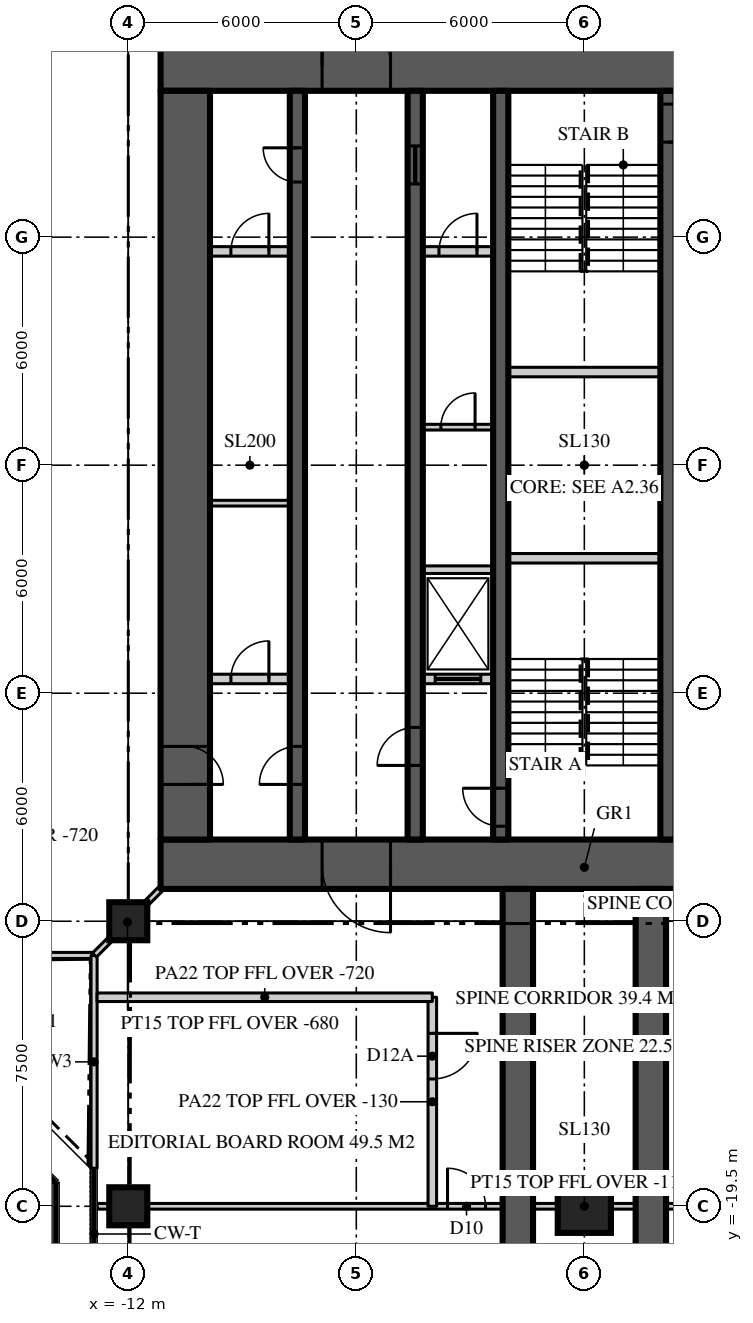
"""IFC4 building model, lengths in metres.
Left out: names, types, materials, properties, quantities, classifications, styles, units other than length and angle.
Written with IfcOpenShell. Run it as: python <this file> out.ifc"""

import sys

from ifc_helpers import new_model, si_unit, direction, frame, frame_2d, origin, origin_2d, place, context, subcontext, project, spatial, rectangle, extrude, element, fill, save


model = new_model("IFC4")
c1 = context("Model", 3, precision=1e-05, world=origin(), true_north=direction((0.0, 1.0)))
c2 = subcontext(c1, "Body", "Model", "MODEL_VIEW")
j1 = project(units=[si_unit("LENGTHUNIT", "METRE"), si_unit("PLANEANGLEUNIT", "RADIAN")], contexts=[c1])
p1 = place(None, origin())
s1 = spatial("IfcSite", under=j1, at=p1, CompositionType="ELEMENT")
p2 = place(p1, origin())
s2 = spatial("IfcBuilding", under=s1, at=p2, CompositionType="ELEMENT")
p3 = place(p2, frame((0.0, 0.0, 282.9)))
s3 = spatial("IfcBuildingStorey", under=s2, at=p3, CompositionType="ELEMENT", Elevation=282.9)
p4 = place(p3, frame((-11.15, 10.5, 0.0), z_axis=(0.0, 0.0, 1.0), x_axis=(1.0, 0.0, 0.0)))
e1 = element("IfcWall", 1, at=p4, inside=s3, PredefinedType="SHEAR", context=c2, shape_type="SweptSolid", body=[
    extrude(rectangle(XDim=22.3, YDim=1.3, at=frame_2d((11.15, 0.0))), origin(), (0.0, 0.0, 1.0), 3.9),
])
p5 = place(p4, frame((4.25, 0.0, 0.0)))
e2 = element("IfcOpeningElement", 2, at=p5, cuts=e1, PredefinedType="OPENING", context=c2, shape_type="SweptSolid", body=[
    extrude(rectangle(XDim=1.8, YDim=2.2, at=frame_2d((0.9, 1.1))), frame((0.0, 0.66, 0.0), z_axis=(0.0, -1.0, 0.0), x_axis=(1.0, 0.0, 0.0)), (0.0, 0.0, 1.0), 1.32),
])
p6 = place(p4, frame((16.25, 0.0, 0.0)))
e3 = element("IfcOpeningElement", 3, at=p6, cuts=e1, PredefinedType="OPENING", context=c2, shape_type="SweptSolid", body=[
    extrude(rectangle(XDim=1.8, YDim=2.2, at=frame_2d((0.9, 1.1))), frame((0.0, 0.66, 0.0), z_axis=(0.0, -1.0, 0.0), x_axis=(1.0, 0.0, 0.0)), (0.0, 0.0, 1.0), 1.32),
])
p7 = place(p3, frame((11.15, -10.5, 0.0), z_axis=(0.0, 0.0, 1.0), x_axis=(-1.0, 0.0, 0.0)))
e4 = element("IfcWall", 4, at=p7, inside=s3, PredefinedType="SHEAR", context=c2, shape_type="SweptSolid", body=[
    extrude(rectangle(XDim=22.3, YDim=1.3, at=frame_2d((11.15, 0.0))), origin(), (0.0, 0.0, 1.0), 3.9),
])
p8 = place(p7, frame((16.25, 0.0, 0.0)))
e5 = element("IfcOpeningElement", 5, at=p8, cuts=e4, PredefinedType="OPENING", context=c2, shape_type="SweptSolid", body=[
    extrude(rectangle(XDim=1.8, YDim=2.2, at=frame_2d((0.9, 1.1))), frame((0.0, 0.66, 0.0), z_axis=(0.0, -1.0, 0.0), x_axis=(1.0, 0.0, 0.0)), (0.0, 0.0, 1.0), 1.32),
])
p9 = place(p7, frame((4.25, 0.0, 0.0)))
e6 = element("IfcOpeningElement", 6, at=p9, cuts=e4, PredefinedType="OPENING", context=c2, shape_type="SweptSolid", body=[
    extrude(rectangle(XDim=1.8, YDim=2.2, at=frame_2d((0.9, 1.1))), frame((0.0, 0.66, 0.0), z_axis=(0.0, -1.0, 0.0), x_axis=(1.0, 0.0, 0.0)), (0.0, 0.0, 1.0), 1.32),
])
p10 = place(p3, frame((-10.5, 9.85, 0.0), z_axis=(0.0, 0.0, 1.0), x_axis=(0.0, -1.0, 0.0)))
e7 = element("IfcWall", 7, at=p10, inside=s3, PredefinedType="SHEAR", context=c2, shape_type="SweptSolid", body=[
    extrude(rectangle(XDim=19.7, YDim=1.3, at=frame_2d((9.85, 0.0))), origin(), (0.0, 0.0, 1.0), 3.9),
])
p11 = place(p10, frame((17.25, 0.0, 0.0)))
e8 = element("IfcOpeningElement", 8, at=p11, cuts=e7, PredefinedType="OPENING", context=c2, shape_type="SweptSolid", body=[
    extrude(rectangle(XDim=1.0, YDim=2.2, at=frame_2d((0.5, 1.1))), frame((0.0, 0.66, 0.0), z_axis=(0.0, -1.0, 0.0), x_axis=(1.0, 0.0, 0.0)), (0.0, 0.0, 1.0), 1.32),
])
for number, where, z_axis, x_axis in (
    (9, (-1.75, -11.15, 0.0), (0.0, 0.0, 1.0), (0.0, -1.0, 0.0)),
    (10, (1.75, -11.15, 0.0), (0.0, 0.0, 1.0), (0.0, -1.0, 0.0)),
):
    element("IfcWall", number, at=place(p3, frame(where, z_axis=z_axis, x_axis=x_axis)), inside=s3, PredefinedType="SHEAR", context=c2, shape_type="SweptSolid", body=[
        extrude(rectangle(XDim=15.25, YDim=0.8, at=frame_2d((7.625, 0.0))), origin(), (0.0, 0.0, 1.0), 3.9),
    ])
p12 = place(p3, frame((-12.0, -19.5, 0.0), z_axis=(0.0, 0.0, 1.0), x_axis=(1.0, 0.0, 0.0)))
e11 = element("IfcColumn", 11, at=p12, inside=s3, PredefinedType="COLUMN", context=c2, shape_type="SweptSolid", body=[
    extrude(rectangle(XDim=1.0, YDim=1.0, at=origin_2d()), origin(), (0.0, 0.0, 1.0), 3.9),
])
p13 = place(p3, frame((0.0, -19.5, 0.0), z_axis=(0.0, 0.0, 1.0), x_axis=(1.0, 0.0, 0.0)))
e12 = element("IfcColumn", 12, at=p13, inside=s3, PredefinedType="COLUMN", context=c2, shape_type="SweptSolid", body=[
    extrude(rectangle(XDim=1.4, YDim=1.4, at=origin_2d()), origin(), (0.0, 0.0, 1.0), 3.9),
])
p14 = place(p3, frame((-12.0, -12.0, 0.0), z_axis=(0.0, 0.0, 1.0), x_axis=(1.0, 0.0, 0.0)))
e13 = element("IfcColumn", 13, at=p14, inside=s3, PredefinedType="COLUMN", context=c2, shape_type="SweptSolid", body=[
    extrude(rectangle(XDim=1.0, YDim=1.0, at=origin_2d()), origin(), (0.0, 0.0, 1.0), 3.9),
])
p15 = place(p3, frame((-18.5, -12.9, 0.0), z_axis=(0.0, 0.0, 1.0), x_axis=(1.0, 0.0, 0.0)))
e14 = element("IfcWall", 14, at=p15, inside=s3, PredefinedType="SOLIDWALL", context=c2, shape_type="SweptSolid", body=[
    extrude(rectangle(XDim=5.6, YDim=0.16, at=frame_2d((2.8, 0.0))), origin(), (0.0, 0.0, 1.0), 3.77),
])
p16 = place(p15, frame((2.3, 0.0, 0.0)))
e15 = element("IfcOpeningElement", 15, at=p16, cuts=e14, PredefinedType="OPENING", context=c2, shape_type="SweptSolid", body=[
    extrude(rectangle(XDim=1.0, YDim=2.2, at=frame_2d((0.5, 1.1))), frame((0.0, 0.09, 0.0), z_axis=(0.0, -1.0, 0.0), x_axis=(1.0, 0.0, 0.0)), (0.0, 0.0, 1.0), 0.18),
])
p17 = place(p3, frame((-12.9, -12.9, 0.0), z_axis=(0.0, 0.0, 1.0), x_axis=(0.0, -1.0, 0.0)))
e16 = element("IfcWall", 16, at=p17, inside=s3, PredefinedType="SOLIDWALL", context=c2, shape_type="SweptSolid", body=[
    extrude(rectangle(XDim=5.6, YDim=0.16, at=frame_2d((2.8, 0.0))), origin(), (0.0, 0.0, 1.0), 3.77),
])
p18 = place(p3, frame((-7.55, -9.85, 0.0), z_axis=(0.0, 0.0, 1.0), x_axis=(0.0, 1.0, 0.0)))
e17 = element("IfcWall", 17, at=p18, inside=s3, PredefinedType="SHEAR", context=c2, shape_type="SweptSolid", body=[
    extrude(rectangle(XDim=19.7, YDim=0.4, at=frame_2d((9.85, 0.0))), origin(), (0.0, 0.0, 1.0), 3.9),
])
p19 = place(p18, frame((1.45, 0.0, 0.0)))
e18 = element("IfcOpeningElement", 18, at=p19, cuts=e17, PredefinedType="OPENING", context=c2, shape_type="SweptSolid", body=[
    extrude(rectangle(XDim=1.0, YDim=2.2, at=frame_2d((0.5, 1.1))), frame((0.0, 0.21, 0.0), z_axis=(0.0, -1.0, 0.0), x_axis=(1.0, 0.0, 0.0)), (0.0, 0.0, 1.0), 0.42),
])
p20 = place(p18, frame((17.3, 0.0, 0.0)))
e19 = element("IfcOpeningElement", 19, at=p20, cuts=e17, PredefinedType="OPENING", context=c2, shape_type="SweptSolid", body=[
    extrude(rectangle(XDim=0.9, YDim=2.1, at=frame_2d((0.45, 1.05))), frame((0.0, 0.21, 0.0), z_axis=(0.0, -1.0, 0.0), x_axis=(1.0, 0.0, 0.0)), (0.0, 0.0, 1.0), 0.42),
])
p21 = place(p3, frame((-4.45, -9.85, 0.0), z_axis=(0.0, 0.0, 1.0), x_axis=(0.0, 1.0, 0.0)))
e20 = element("IfcWall", 20, at=p21, inside=s3, PredefinedType="SHEAR", context=c2, shape_type="SweptSolid", body=[
    extrude(rectangle(XDim=19.7, YDim=0.4, at=frame_2d((9.85, 0.0))), origin(), (0.0, 0.0, 1.0), 3.9),
])
p22 = place(p21, frame((1.95, 0.0, 0.0)))
e21 = element("IfcOpeningElement", 21, at=p22, cuts=e20, PredefinedType="OPENING", context=c2, shape_type="SweptSolid", body=[
    extrude(rectangle(XDim=1.0, YDim=2.2, at=frame_2d((0.5, 1.1))), frame((0.0, 0.21, 0.0), z_axis=(0.0, -1.0, 0.0), x_axis=(1.0, 0.0, 0.0)), (0.0, 0.0, 1.0), 0.42),
])
p23 = place(p21, frame((17.25, 0.0, 0.0)))
e22 = element("IfcOpeningElement", 22, at=p23, cuts=e20, PredefinedType="OPENING", context=c2, shape_type="SweptSolid", body=[
    extrude(rectangle(XDim=1.0, YDim=2.1, at=frame_2d((0.5, 1.05))), frame((0.0, 0.21, 0.0), z_axis=(0.0, -1.0, 0.0), x_axis=(1.0, 0.0, 0.0)), (0.0, 0.0, 1.0), 0.42),
])
p24 = place(p3, frame((-2.2, -9.85, 0.0), z_axis=(0.0, 0.0, 1.0), x_axis=(0.0, 1.0, 0.0)))
e23 = element("IfcWall", 23, at=p24, inside=s3, PredefinedType="SHEAR", context=c2, shape_type="SweptSolid", body=[
    extrude(rectangle(XDim=19.7, YDim=0.4, at=frame_2d((9.85, 0.0))), origin(), (0.0, 0.0, 1.0), 3.9),
])
p25 = place(p24, frame((0.35, 0.0, 0.0)))
e24 = element("IfcOpeningElement", 24, at=p25, cuts=e23, PredefinedType="OPENING", context=c2, shape_type="SweptSolid", body=[
    extrude(rectangle(XDim=1.0, YDim=2.2, at=frame_2d((0.5, 1.1))), frame((0.0, 0.21, 0.0), z_axis=(0.0, -1.0, 0.0), x_axis=(1.0, 0.0, 0.0)), (0.0, 0.0, 1.0), 0.42),
])
p26 = place(p3, frame((2.2, 9.85, 0.0), z_axis=(0.0, 0.0, 1.0), x_axis=(0.0, -1.0, 0.0)))
e25 = element("IfcWall", 25, at=p26, inside=s3, PredefinedType="SHEAR", context=c2, shape_type="SweptSolid", body=[
    extrude(rectangle(XDim=19.7, YDim=0.4, at=frame_2d((9.85, 0.0))), origin(), (0.0, 0.0, 1.0), 3.9),
])
p27 = place(p26, frame((0.35, 0.0, 0.0)))
e26 = element("IfcOpeningElement", 26, at=p27, cuts=e25, PredefinedType="OPENING", context=c2, shape_type="SweptSolid", body=[
    extrude(rectangle(XDim=1.0, YDim=2.2, at=frame_2d((0.5, 1.1))), frame((0.0, 0.21, 0.0), z_axis=(0.0, -1.0, 0.0), x_axis=(1.0, 0.0, 0.0)), (0.0, 0.0, 1.0), 0.42),
])
p28 = place(p3, frame((-9.85, 5.625, 0.0), z_axis=(0.0, 0.0, 1.0), x_axis=(1.0, 0.0, 0.0)))
e27 = element("IfcWall", 27, at=p28, inside=s3, PredefinedType="SOLIDWALL", context=c2, shape_type="SweptSolid", body=[
    extrude(rectangle(XDim=2.1, YDim=0.25, at=frame_2d((1.05, 0.0))), origin(), (0.0, 0.0, 1.0), 3.7),
])
p29 = place(p28, frame((0.55, 0.0, 0.0)))
e28 = element("IfcOpeningElement", 28, at=p29, cuts=e27, PredefinedType="OPENING", context=c2, shape_type="SweptSolid", body=[
    extrude(rectangle(XDim=1.0, YDim=2.2, at=frame_2d((0.5, 1.1))), frame((0.0, 0.135, 0.0), z_axis=(0.0, -1.0, 0.0), x_axis=(1.0, 0.0, 0.0)), (0.0, 0.0, 1.0), 0.27),
])
p30 = place(p3, frame((-4.25, 5.625, 0.0), z_axis=(0.0, 0.0, 1.0), x_axis=(1.0, 0.0, 0.0)))
e29 = element("IfcWall", 29, at=p30, inside=s3, PredefinedType="SOLIDWALL", context=c2, shape_type="SweptSolid", body=[
    extrude(rectangle(XDim=1.85, YDim=0.25, at=frame_2d((0.925, 0.0))), origin(), (0.0, 0.0, 1.0), 3.7),
])
p31 = place(p30, frame((0.425, 0.0, 0.0)))
e30 = element("IfcOpeningElement", 30, at=p31, cuts=e29, PredefinedType="OPENING", context=c2, shape_type="SweptSolid", body=[
    extrude(rectangle(XDim=1.0, YDim=2.2, at=frame_2d((0.5, 1.1))), frame((0.0, 0.135, 0.0), z_axis=(0.0, -1.0, 0.0), x_axis=(1.0, 0.0, 0.0)), (0.0, 0.0, 1.0), 0.27),
])
p32 = place(p3, frame((-9.85, -5.625, 0.0), z_axis=(0.0, 0.0, 1.0), x_axis=(1.0, 0.0, 0.0)))
e31 = element("IfcWall", 31, at=p32, inside=s3, PredefinedType="SOLIDWALL", context=c2, shape_type="SweptSolid", body=[
    extrude(rectangle(XDim=2.1, YDim=0.25, at=frame_2d((1.05, 0.0))), origin(), (0.0, 0.0, 1.0), 3.7),
])
p33 = place(p32, frame((0.55, 0.0, 0.0)))
e32 = element("IfcOpeningElement", 32, at=p33, cuts=e31, PredefinedType="OPENING", context=c2, shape_type="SweptSolid", body=[
    extrude(rectangle(XDim=1.0, YDim=2.2, at=frame_2d((0.5, 1.1))), frame((0.0, 0.135, 0.0), z_axis=(0.0, -1.0, 0.0), x_axis=(1.0, 0.0, 0.0)), (0.0, 0.0, 1.0), 0.27),
])
p34 = place(p3, frame((-4.25, -5.625, 0.0), z_axis=(0.0, 0.0, 1.0), x_axis=(1.0, 0.0, 0.0)))
e33 = element("IfcWall", 33, at=p34, inside=s3, PredefinedType="SOLIDWALL", context=c2, shape_type="SweptSolid", body=[
    extrude(rectangle(XDim=1.85, YDim=0.25, at=frame_2d((0.925, 0.0))), origin(), (0.0, 0.0, 1.0), 3.7),
])
p35 = place(p34, frame((0.325, 0.0, 0.0)))
e34 = element("IfcOpeningElement", 34, at=p35, cuts=e33, PredefinedType="OPENING", context=c2, shape_type="SweptSolid", body=[
    extrude(rectangle(XDim=1.2, YDim=2.2, at=frame_2d((0.6, 1.1))), frame((0.0, 0.135, 0.0), z_axis=(0.0, -1.0, 0.0), x_axis=(1.0, 0.0, 0.0)), (0.0, 0.0, 1.0), 0.27),
])
for number, where, z_axis, x_axis in (
    (35, (-2.0, -2.45, 0.0), (0.0, 0.0, 1.0), (1.0, 0.0, 0.0)),
    (36, (-2.0, 2.45, 0.0), (0.0, 0.0, 1.0), (1.0, 0.0, 0.0)),
):
    element("IfcWall", number, at=place(p3, frame(where, z_axis=z_axis, x_axis=x_axis)), inside=s3, PredefinedType="SOLIDWALL", context=c2, shape_type="SweptSolid", body=[
        extrude(rectangle(XDim=4.0, YDim=0.25, at=frame_2d((2.0, 0.0))), origin(), (0.0, 0.0, 1.0), 3.7),
    ])
p36 = place(p3, frame((-4.25, -2.75, 0.0), z_axis=(0.0, 0.0, 1.0), x_axis=(1.0, 0.0, 0.0)))
e37 = element("IfcWall", 37, at=p36, inside=s3, PredefinedType="SOLIDWALL", context=c2, shape_type="SweptSolid", body=[
    extrude(rectangle(XDim=1.85, YDim=0.2, at=frame_2d((0.925, 0.0))), origin(), (0.0, 0.0, 1.0), 3.7),
])
p37 = place(p3, frame((-12.82, -19.5, 0.0), z_axis=(0.0, 0.0, 1.0), x_axis=(1.0, 0.0, 0.0)))
e38 = element("IfcWall", 38, at=p37, inside=s3, PredefinedType="PARTITIONING", context=c2, shape_type="SweptSolid", body=[
    extrude(rectangle(XDim=25.64, YDim=0.15, at=frame_2d((12.82, 0.0))), origin(), (0.0, 0.0, 1.0), 2.77),
])
p38 = place(p37, frame((15.42, 0.0, 0.0)))
e39 = element("IfcOpeningElement", 39, at=p38, cuts=e38, PredefinedType="OPENING", context=c2, shape_type="SweptSolid", body=[
    extrude(rectangle(XDim=1.0, YDim=2.2, at=frame_2d((0.5, 1.1))), frame((0.0, 0.085, 0.0), z_axis=(0.0, -1.0, 0.0), x_axis=(1.0, 0.0, 0.0)), (0.0, 0.0, 1.0), 0.17),
])
p39 = place(p37, frame((9.22, 0.0, 0.0)))
e40 = element("IfcOpeningElement", 40, at=p39, cuts=e38, PredefinedType="OPENING", context=c2, shape_type="SweptSolid", body=[
    extrude(rectangle(XDim=1.0, YDim=2.2, at=frame_2d((0.5, 1.1))), frame((0.0, 0.085, 0.0), z_axis=(0.0, -1.0, 0.0), x_axis=(1.0, 0.0, 0.0)), (0.0, 0.0, 1.0), 0.17),
])
p40 = place(p3, frame((-4.0, -14.0, 0.0), z_axis=(0.0, 0.0, 1.0), x_axis=(0.0, -1.0, 0.0)))
e41 = element("IfcWall", 41, at=p40, inside=s3, PredefinedType="PARTITIONING", context=c2, shape_type="SweptSolid", body=[
    extrude(rectangle(XDim=5.5, YDim=0.225, at=frame_2d((2.75, 0.0))), origin(), (0.0, 0.0, 1.0), 3.77),
])
p41 = place(p40, frame((0.95, 0.0, 0.0)))
e42 = element("IfcOpeningElement", 42, at=p41, cuts=e41, PredefinedType="OPENING", context=c2, shape_type="SweptSolid", body=[
    extrude(rectangle(XDim=1.2, YDim=2.2, at=frame_2d((0.6, 1.1))), frame((0.0, 0.123, 0.0), z_axis=(0.0, -1.0, 0.0), x_axis=(1.0, 0.0, 0.0)), (0.0, 0.0, 1.0), 0.245),
])
p42 = place(p3, frame((-4.0, -14.0, 0.0), z_axis=(0.0, 0.0, 1.0), x_axis=(-1.0, 0.0, 0.0)))
e43 = element("IfcWall", 43, at=p42, inside=s3, PredefinedType="PARTITIONING", context=c2, shape_type="SweptSolid", body=[
    extrude(rectangle(XDim=8.82, YDim=0.225, at=frame_2d((4.41, 0.0))), origin(), (0.0, 0.0, 1.0), 3.18),
])
p43 = place(p3, frame((-11.15, -11.15, 0.0), z_axis=(0.0, 0.0, 1.0), x_axis=(-0.707106781187, -0.707106781187, 0.0)))
e44 = element("IfcWall", 44, at=p43, inside=s3, PredefinedType="PARTITIONING", context=c2, shape_type="SweptSolid", body=[
    extrude(rectangle(XDim=2.461, YDim=0.15, at=frame_2d((1.23, 0.0))), origin(), (0.0, 0.0, 1.0), 3.22),
])
p44 = place(p3, frame((-9.85, -1.0, 0.0), z_axis=(0.0, 0.0, 1.0), x_axis=(1.0, 0.0, 0.0)))
e45 = element("IfcWall", 45, at=p44, inside=s3, PredefinedType="SOLIDWALL", context=c2, shape_type="SweptSolid", body=[
    extrude(rectangle(XDim=2.1, YDim=0.15, at=frame_2d((1.05, 0.0))), origin(), (0.0, 0.0, 1.0), 3.77),
])
p45 = place(p3, frame((-4.25, 1.0, 0.0), z_axis=(0.0, 0.0, 1.0), x_axis=(1.0, 0.0, 0.0)))
e46 = element("IfcWall", 46, at=p45, inside=s3, PredefinedType="SOLIDWALL", context=c2, shape_type="SweptSolid", body=[
    extrude(rectangle(XDim=1.85, YDim=0.15, at=frame_2d((0.925, 0.0))), origin(), (0.0, 0.0, 1.0), 3.77),
])
p46 = place(p45, frame((0.475, 0.0, 0.0)))
e47 = element("IfcOpeningElement", 47, at=p46, cuts=e46, PredefinedType="OPENING", context=c2, shape_type="SweptSolid", body=[
    extrude(rectangle(XDim=0.9, YDim=2.1, at=frame_2d((0.45, 1.05))), frame((0.0, 0.085, 0.0), z_axis=(0.0, -1.0, 0.0), x_axis=(1.0, 0.0, 0.0)), (0.0, 0.0, 1.0), 0.17),
])
p47 = place(p5, origin())
e48 = element("IfcDoor", 48, at=p47, inside=s3, OperationType="DOUBLE_DOOR_DOUBLE_SWING", PredefinedType="DOOR", context=c2, shape_type="SweptSolid", body=[
    extrude(rectangle(XDim=1.8, YDim=2.2, at=frame_2d((0.9, 1.1))), frame((0.0, 0.025, 0.0), z_axis=(0.0, -1.0, 0.0), x_axis=(1.0, 0.0, 0.0)), (0.0, 0.0, 1.0), 0.05),
])
fill(e2, e48)
p48 = place(p8, origin())
e49 = element("IfcDoor", 49, at=p48, inside=s3, OperationType="DOUBLE_DOOR_DOUBLE_SWING", PredefinedType="DOOR", context=c2, shape_type="SweptSolid", body=[
    extrude(rectangle(XDim=1.8, YDim=2.2, at=frame_2d((0.9, 1.1))), frame((0.0, 0.025, 0.0), z_axis=(0.0, -1.0, 0.0), x_axis=(1.0, 0.0, 0.0)), (0.0, 0.0, 1.0), 0.05),
])
fill(e5, e49)
p49 = place(p19, origin())
e50 = element("IfcDoor", 50, at=p49, inside=s3, OperationType="SINGLE_SWING_LEFT", PredefinedType="DOOR", context=c2, shape_type="SweptSolid", body=[
    extrude(rectangle(XDim=1.0, YDim=2.2, at=frame_2d((0.5, 1.1))), frame((0.0, 0.025, 0.0), z_axis=(0.0, -1.0, 0.0), x_axis=(1.0, 0.0, 0.0)), (0.0, 0.0, 1.0), 0.05),
])
fill(e18, e50)
p50 = place(p11, origin())
e51 = element("IfcDoor", 51, at=p50, inside=s3, OperationType="SINGLE_SWING_RIGHT", PredefinedType="DOOR", context=c2, shape_type="SweptSolid", body=[
    extrude(rectangle(XDim=1.0, YDim=2.2, at=frame_2d((0.5, 1.1))), frame((0.0, 0.025, 0.0), z_axis=(0.0, -1.0, 0.0), x_axis=(1.0, 0.0, 0.0)), (0.0, 0.0, 1.0), 0.05),
])
fill(e8, e51)
p51 = place(p22, origin())
e52 = element("IfcDoor", 52, at=p51, inside=s3, OperationType="SINGLE_SWING_LEFT", PredefinedType="DOOR", context=c2, shape_type="SweptSolid", body=[
    extrude(rectangle(XDim=1.0, YDim=2.2, at=frame_2d((0.5, 1.1))), frame((0.0, 0.025, 0.0), z_axis=(0.0, -1.0, 0.0), x_axis=(1.0, 0.0, 0.0)), (0.0, 0.0, 1.0), 0.05),
])
fill(e21, e52)
p52 = place(p25, origin())
e53 = element("IfcDoor", 53, at=p52, inside=s3, OperationType="SINGLE_SWING_RIGHT", PredefinedType="DOOR", context=c2, shape_type="SweptSolid", body=[
    extrude(rectangle(XDim=1.0, YDim=2.2, at=frame_2d((0.5, 1.1))), frame((0.0, 0.025, 0.0), z_axis=(0.0, -1.0, 0.0), x_axis=(1.0, 0.0, 0.0)), (0.0, 0.0, 1.0), 0.05),
])
fill(e24, e53)
p53 = place(p27, origin())
e54 = element("IfcDoor", 54, at=p53, inside=s3, OperationType="SINGLE_SWING_RIGHT", PredefinedType="DOOR", context=c2, shape_type="SweptSolid", body=[
    extrude(rectangle(XDim=1.0, YDim=2.2, at=frame_2d((0.5, 1.1))), frame((0.0, 0.025, 0.0), z_axis=(0.0, -1.0, 0.0), x_axis=(1.0, 0.0, 0.0)), (0.0, 0.0, 1.0), 0.05),
])
fill(e26, e54)
p54 = place(p20, origin())
e55 = element("IfcDoor", 55, at=p54, inside=s3, OperationType="SINGLE_SWING_RIGHT", PredefinedType="DOOR", context=c2, shape_type="SweptSolid", body=[
    extrude(rectangle(XDim=0.9, YDim=2.1, at=frame_2d((0.45, 1.05))), frame((0.0, 0.025, 0.0), z_axis=(0.0, -1.0, 0.0), x_axis=(1.0, 0.0, 0.0)), (0.0, 0.0, 1.0), 0.05),
])
fill(e19, e55)
p55 = place(p23, origin())
e56 = element("IfcDoor", 56, at=p55, inside=s3, OperationType="SLIDING_TO_LEFT", PredefinedType="DOOR", context=c2, shape_type="SweptSolid", body=[
    extrude(rectangle(XDim=1.0, YDim=2.1, at=frame_2d((0.5, 1.05))), frame((0.0, 0.025, 0.0), z_axis=(0.0, -1.0, 0.0), x_axis=(1.0, 0.0, 0.0)), (0.0, 0.0, 1.0), 0.05),
])
fill(e22, e56)
p56 = place(p35, origin())
e57 = element("IfcDoor", 57, at=p56, inside=s3, OperationType="SLIDING_TO_LEFT", PredefinedType="DOOR", context=c2, shape_type="SweptSolid", body=[
    extrude(rectangle(XDim=1.2, YDim=2.2, at=frame_2d((0.6, 1.1))), frame((0.0, 0.025, 0.0), z_axis=(0.0, -1.0, 0.0), x_axis=(1.0, 0.0, 0.0)), (0.0, 0.0, 1.0), 0.05),
])
fill(e34, e57)
p57 = place(p39, origin())
e58 = element("IfcDoor", 58, at=p57, inside=s3, OperationType="SINGLE_SWING_LEFT", PredefinedType="DOOR", context=c2, shape_type="SweptSolid", body=[
    extrude(rectangle(XDim=1.0, YDim=2.2, at=frame_2d((0.5, 1.1))), frame((0.0, 0.025, 0.0), z_axis=(0.0, -1.0, 0.0), x_axis=(1.0, 0.0, 0.0)), (0.0, 0.0, 1.0), 0.05),
])
fill(e40, e58)
p58 = place(p41, origin())
e59 = element("IfcDoor", 59, at=p58, inside=s3, OperationType="SINGLE_SWING_LEFT", PredefinedType="DOOR", context=c2, shape_type="SweptSolid", body=[
    extrude(rectangle(XDim=1.2, YDim=2.2, at=frame_2d((0.6, 1.1))), frame((0.0, 0.025, 0.0), z_axis=(0.0, -1.0, 0.0), x_axis=(1.0, 0.0, 0.0)), (0.0, 0.0, 1.0), 0.05),
])
fill(e42, e59)
p59 = place(p29, origin())
e60 = element("IfcDoor", 60, at=p59, inside=s3, OperationType="SINGLE_SWING_RIGHT", PredefinedType="DOOR", context=c2, shape_type="SweptSolid", body=[
    extrude(rectangle(XDim=1.0, YDim=2.2, at=frame_2d((0.5, 1.1))), frame((0.0, 0.025, 0.0), z_axis=(0.0, -1.0, 0.0), x_axis=(1.0, 0.0, 0.0)), (0.0, 0.0, 1.0), 0.05),
])
fill(e28, e60)
p60 = place(p33, origin())
e61 = element("IfcDoor", 61, at=p60, inside=s3, OperationType="SINGLE_SWING_RIGHT", PredefinedType="DOOR", context=c2, shape_type="SweptSolid", body=[
    extrude(rectangle(XDim=1.0, YDim=2.2, at=frame_2d((0.5, 1.1))), frame((0.0, 0.025, 0.0), z_axis=(0.0, -1.0, 0.0), x_axis=(1.0, 0.0, 0.0)), (0.0, 0.0, 1.0), 0.05),
])
fill(e32, e61)
p61 = place(p46, origin())
e62 = element("IfcDoor", 62, at=p61, inside=s3, OperationType="SINGLE_SWING_RIGHT", PredefinedType="DOOR", context=c2, shape_type="SweptSolid", body=[
    extrude(rectangle(XDim=0.9, YDim=2.1, at=frame_2d((0.45, 1.05))), frame((0.0, 0.025, 0.0), z_axis=(0.0, -1.0, 0.0), x_axis=(1.0, 0.0, 0.0)), (0.0, 0.0, 1.0), 0.05),
])
fill(e47, e62)
p62 = place(p31, origin())
e63 = element("IfcDoor", 63, at=p62, inside=s3, OperationType="SINGLE_SWING_RIGHT", PredefinedType="DOOR", context=c2, shape_type="SweptSolid", body=[
    extrude(rectangle(XDim=1.0, YDim=2.2, at=frame_2d((0.5, 1.1))), frame((0.0, 0.025, 0.0), z_axis=(0.0, -1.0, 0.0), x_axis=(1.0, 0.0, 0.0)), (0.0, 0.0, 1.0), 0.05),
])
fill(e30, e63)
save(model, sys.argv[1])
